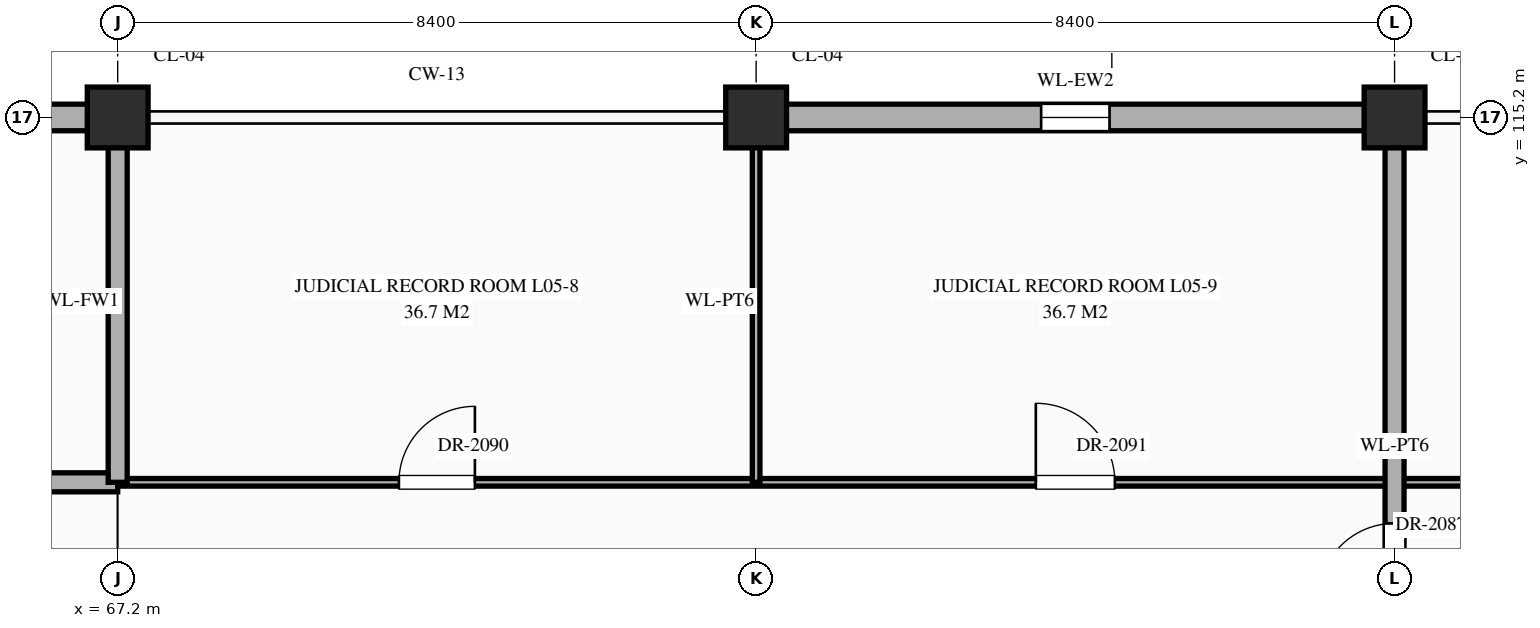
"""IFC4 building model, lengths in metres.
Left out: names, types, materials, properties, quantities, classifications, styles, units other than length and angle.
Written with IfcOpenShell. Run it as: python <this file> out.ifc"""

import sys

from ifc_helpers import new_model, si_unit, direction, frame, frame_2d, origin, origin_2d, place, context, subcontext, project, spatial, rectangle, extrude, element, fill, save


model = new_model("IFC4")
c1 = context("Model", 3, precision=1e-05, world=origin(), true_north=direction((0.0, 1.0)))
c2 = subcontext(c1, "Body", "Model", "MODEL_VIEW")
j1 = project(units=[si_unit("LENGTHUNIT", "METRE"), si_unit("PLANEANGLEUNIT", "RADIAN")], contexts=[c1])
p1 = place(None, origin())
s1 = spatial("IfcSite", under=j1, at=p1, CompositionType="ELEMENT")
p2 = place(p1, origin())
s2 = spatial("IfcBuilding", under=s1, at=p2, CompositionType="ELEMENT")
p3 = place(p2, frame((0.0, 0.0, 21.6)))
s3 = spatial("IfcBuildingStorey", under=s2, at=p3, CompositionType="ELEMENT", Elevation=21.6)
for number, where, z_axis, x_axis in (
    (1, (67.2, 115.2, 0.0), (0.0, 0.0, 1.0), (1.0, 0.0, 0.0)),
    (2, (75.6, 115.2, 0.0), (0.0, 0.0, 1.0), (1.0, 0.0, 0.0)),
    (3, (84.0, 115.2, 0.0), (0.0, 0.0, 1.0), (1.0, 0.0, 0.0)),
):
    element("IfcColumn", number, at=place(p3, frame(where, z_axis=z_axis, x_axis=x_axis)), inside=s3, PredefinedType="COLUMN", context=c2, shape_type="SweptSolid", body=[
        extrude(rectangle(XDim=0.8, YDim=0.8, at=origin_2d()), origin(), (0.0, 0.0, 1.0), 4.5),
    ])
p4 = place(p3, frame((59.195, 115.2, 0.0), z_axis=(0.0, 0.0, 1.0), x_axis=(1.0, 0.0, 0.0)))
e4 = element("IfcWall", 4, at=p4, inside=s3, PredefinedType="STANDARD", context=c2, shape_type="SweptSolid", body=[
    extrude(rectangle(XDim=7.61, YDim=0.35, at=frame_2d((3.805, 0.0))), origin(), (0.0, 0.0, 1.0), 3.59),
])
p5 = place(p3, frame((75.995, 115.2, 0.0), z_axis=(0.0, 0.0, 1.0), x_axis=(1.0, 0.0, 0.0)))
e5 = element("IfcWall", 5, at=p5, inside=s3, PredefinedType="STANDARD", context=c2, shape_type="SweptSolid", body=[
    extrude(rectangle(XDim=7.61, YDim=0.35, at=frame_2d((3.805, 0.0))), origin(), (0.0, 0.0, 1.0), 3.59),
])
p6 = place(p5, frame((3.355, 0.0, 0.85)))
e6 = element("IfcOpeningElement", 6, at=p6, cuts=e5, PredefinedType="OPENING", context=c2, shape_type="SweptSolid", body=[
    extrude(rectangle(XDim=0.9, YDim=2.12, at=frame_2d((0.45, 1.06))), frame((0.0, 0.187, 0.0), z_axis=(0.0, -1.0, 0.0), x_axis=(1.0, 0.0, 0.0)), (0.0, 0.0, 1.0), 0.374),
])
p7 = place(p3, frame((58.8, 110.4, 0.0), z_axis=(0.0, 0.0, 1.0), x_axis=(1.0, 0.0, 0.0)))
e7 = element("IfcWall", 7, at=p7, inside=s3, PredefinedType="STANDARD", context=c2, shape_type="SweptSolid", body=[
    extrude(rectangle(XDim=8.4, YDim=0.25, at=frame_2d((4.2, 0.0))), origin(), (0.0, 0.0, 1.0), 4.24),
])
p8 = place(p7, frame((3.65, 0.0, 0.0)))
e8 = element("IfcOpeningElement", 8, at=p8, cuts=e7, PredefinedType="OPENING", context=c2, shape_type="SweptSolid", body=[
    extrude(rectangle(XDim=1.1, YDim=2.2, at=frame_2d((0.55, 1.1))), frame((0.0, 0.137, 0.0), z_axis=(0.0, -1.0, 0.0), x_axis=(1.0, 0.0, 0.0)), (0.0, 0.0, 1.0), 0.274),
])
p9 = place(p3, frame((67.2, 110.4, 0.0), z_axis=(0.0, 0.0, 1.0), x_axis=(1.0, 0.0, 0.0)))
e9 = element("IfcWall", 9, at=p9, inside=s3, PredefinedType="STANDARD", context=c2, shape_type="SweptSolid", body=[
    extrude(rectangle(XDim=33.6, YDim=0.1, at=frame_2d((16.8, 0.0))), origin(), (0.0, 0.0, 1.0), 4.24),
])
p10 = place(p9, frame((3.7, 0.0, 0.0)))
e10 = element("IfcOpeningElement", 10, at=p10, cuts=e9, PredefinedType="OPENING", context=c2, shape_type="SweptSolid", body=[
    extrude(rectangle(XDim=1.0, YDim=2.25, at=frame_2d((0.5, 1.125))), frame((0.0, 0.062, 0.0), z_axis=(0.0, -1.0, 0.0), x_axis=(1.0, 0.0, 0.0)), (0.0, 0.0, 1.0), 0.124),
])
p11 = place(p9, frame((12.08, 0.0, 0.0)))
e11 = element("IfcOpeningElement", 11, at=p11, cuts=e9, PredefinedType="OPENING", context=c2, shape_type="SweptSolid", body=[
    extrude(rectangle(XDim=1.04, YDim=2.2, at=frame_2d((0.52, 1.1))), frame((0.0, 0.062, 0.0), z_axis=(0.0, -1.0, 0.0), x_axis=(1.0, 0.0, 0.0)), (0.0, 0.0, 1.0), 0.124),
])
p12 = place(p9, frame((20.46, 0.0, 0.0)))
e12 = element("IfcOpeningElement", 12, at=p12, cuts=e9, PredefinedType="OPENING", context=c2, shape_type="SweptSolid", body=[
    extrude(rectangle(XDim=1.08, YDim=2.25, at=frame_2d((0.54, 1.125))), frame((0.0, 0.062, 0.0), z_axis=(0.0, -1.0, 0.0), x_axis=(1.0, 0.0, 0.0)), (0.0, 0.0, 1.0), 0.124),
])
p13 = place(p9, frame((28.84, 0.0, 0.0)))
e13 = element("IfcOpeningElement", 13, at=p13, cuts=e9, PredefinedType="OPENING", context=c2, shape_type="SweptSolid", body=[
    extrude(rectangle(XDim=1.12, YDim=2.25, at=frame_2d((0.56, 1.125))), frame((0.0, 0.062, 0.0), z_axis=(0.0, -1.0, 0.0), x_axis=(1.0, 0.0, 0.0)), (0.0, 0.0, 1.0), 0.124),
])
p14 = place(p3, frame((67.2, 110.4, 0.0), z_axis=(0.0, 0.0, 1.0), x_axis=(0.0, 1.0, 0.0)))
e14 = element("IfcWall", 14, at=p14, inside=s3, PredefinedType="STANDARD", context=c2, shape_type="SweptSolid", body=[
    extrude(rectangle(XDim=4.76, YDim=0.25, at=frame_2d((2.38, 0.0))), origin(), (0.0, 0.0, 1.0), 3.49),
])
p15 = place(p3, frame((75.6, 110.4, 0.0), z_axis=(0.0, 0.0, 1.0), x_axis=(0.0, 1.0, 0.0)))
e15 = element("IfcWall", 15, at=p15, inside=s3, PredefinedType="STANDARD", context=c2, shape_type="SweptSolid", body=[
    extrude(rectangle(XDim=4.76, YDim=0.1, at=frame_2d((2.38, 0.0))), origin(), (0.0, 0.0, 1.0), 3.49),
])
p16 = place(p3, frame((84.0, 79.24, 0.0), z_axis=(0.0, 0.0, 1.0), x_axis=(0.0, 1.0, 0.0)))
e16 = element("IfcWall", 16, at=p16, inside=s3, PredefinedType="STANDARD", context=c2, shape_type="SweptSolid", body=[
    extrude(rectangle(XDim=35.92, YDim=0.25, at=frame_2d((17.96, 0.0))), origin(), (0.0, 0.0, 1.0), 3.49),
])
p17 = place(p16, frame((22.72, 0.0, 0.0)))
e17 = element("IfcOpeningElement", 17, at=p17, cuts=e16, PredefinedType="OPENING", context=c2, shape_type="SweptSolid", body=[
    extrude(rectangle(XDim=1.6, YDim=2.3, at=frame_2d((0.8, 1.15))), frame((0.0, 0.137, 0.0), z_axis=(0.0, -1.0, 0.0), x_axis=(1.0, 0.0, 0.0)), (0.0, 0.0, 1.0), 0.274),
])
p18 = place(p16, frame((12.45, 0.0, 0.0)))
e18 = element("IfcOpeningElement", 18, at=p18, cuts=e16, PredefinedType="OPENING", context=c2, shape_type="SweptSolid", body=[
    extrude(rectangle(XDim=1.1, YDim=2.2, at=frame_2d((0.55, 1.1))), frame((0.0, 0.137, 0.0), z_axis=(0.0, -1.0, 0.0), x_axis=(1.0, 0.0, 0.0)), (0.0, 0.0, 1.0), 0.274),
])
p19 = place(p16, frame((15.245, 0.0, 0.0)))
e19 = element("IfcOpeningElement", 19, at=p19, cuts=e16, PredefinedType="OPENING", context=c2, shape_type="SweptSolid", body=[
    extrude(rectangle(XDim=0.95, YDim=2.15, at=frame_2d((0.475, 1.075))), frame((0.0, 0.137, 0.0), z_axis=(0.0, -1.0, 0.0), x_axis=(1.0, 0.0, 0.0)), (0.0, 0.0, 1.0), 0.274),
])
p20 = place(p16, frame((25.9, 0.0, 0.0)))
e20 = element("IfcOpeningElement", 20, at=p20, cuts=e16, PredefinedType="OPENING", context=c2, shape_type="SweptSolid", body=[
    extrude(rectangle(XDim=1.8, YDim=2.35, at=frame_2d((0.9, 1.175))), frame((0.0, 0.137, 0.0), z_axis=(0.0, -1.0, 0.0), x_axis=(1.0, 0.0, 0.0)), (0.0, 0.0, 1.0), 0.274),
])
p21 = place(p16, frame((29.62, 0.0, 0.0)))
e21 = element("IfcOpeningElement", 21, at=p21, cuts=e16, PredefinedType="OPENING", context=c2, shape_type="SweptSolid", body=[
    extrude(rectangle(XDim=1.0, YDim=2.2, at=frame_2d((0.5, 1.1))), frame((0.0, 0.137, 0.0), z_axis=(0.0, -1.0, 0.0), x_axis=(1.0, 0.0, 0.0)), (0.0, 0.0, 1.0), 0.274),
])
p22 = place(p16, frame((5.3, 0.0, 0.0)))
e22 = element("IfcOpeningElement", 22, at=p22, cuts=e16, PredefinedType="OPENING", context=c2, shape_type="SweptSolid", body=[
    extrude(rectangle(XDim=1.0, YDim=2.2, at=frame_2d((0.5, 1.1))), frame((0.0, 0.137, 0.0), z_axis=(0.0, -1.0, 0.0), x_axis=(1.0, 0.0, 0.0)), (0.0, 0.0, 1.0), 0.274),
])
p23 = place(p6, origin())
e23 = element("IfcWindow", 23, at=p23, inside=s3, PartitioningType="SINGLE_PANEL", PredefinedType="WINDOW", context=c2, shape_type="SweptSolid", body=[
    extrude(rectangle(XDim=0.9, YDim=2.12, at=frame_2d((0.45, 1.06))), frame((0.0, 0.03, 0.0), z_axis=(0.0, -1.0, 0.0), x_axis=(1.0, 0.0, 0.0)), (0.0, 0.0, 1.0), 0.06),
])
fill(e6, e23)
p24 = place(p21, origin())
e24 = element("IfcDoor", 24, at=p24, inside=s3, OperationType="SINGLE_SWING_LEFT", PredefinedType="DOOR", context=c2, shape_type="SweptSolid", body=[
    extrude(rectangle(XDim=1.0, YDim=2.2, at=frame_2d((0.5, 1.1))), frame((0.0, 0.025, 0.0), z_axis=(0.0, -1.0, 0.0), x_axis=(1.0, 0.0, 0.0)), (0.0, 0.0, 1.0), 0.05),
])
fill(e21, e24)
p25 = place(p10, origin())
e25 = element("IfcDoor", 25, at=p25, inside=s3, OperationType="SINGLE_SWING_RIGHT", PredefinedType="DOOR", context=c2, shape_type="SweptSolid", body=[
    extrude(rectangle(XDim=1.0, YDim=2.25, at=frame_2d((0.5, 1.125))), frame((0.0, 0.025, 0.0), z_axis=(0.0, -1.0, 0.0), x_axis=(1.0, 0.0, 0.0)), (0.0, 0.0, 1.0), 0.05),
])
fill(e10, e25)
p26 = place(p11, origin())
e26 = element("IfcDoor", 26, at=p26, inside=s3, OperationType="SINGLE_SWING_LEFT", PredefinedType="DOOR", context=c2, shape_type="SweptSolid", body=[
    extrude(rectangle(XDim=1.04, YDim=2.2, at=frame_2d((0.52, 1.1))), frame((0.0, 0.025, 0.0), z_axis=(0.0, -1.0, 0.0), x_axis=(1.0, 0.0, 0.0)), (0.0, 0.0, 1.0), 0.05),
])
fill(e11, e26)
save(model, sys.argv[1])
